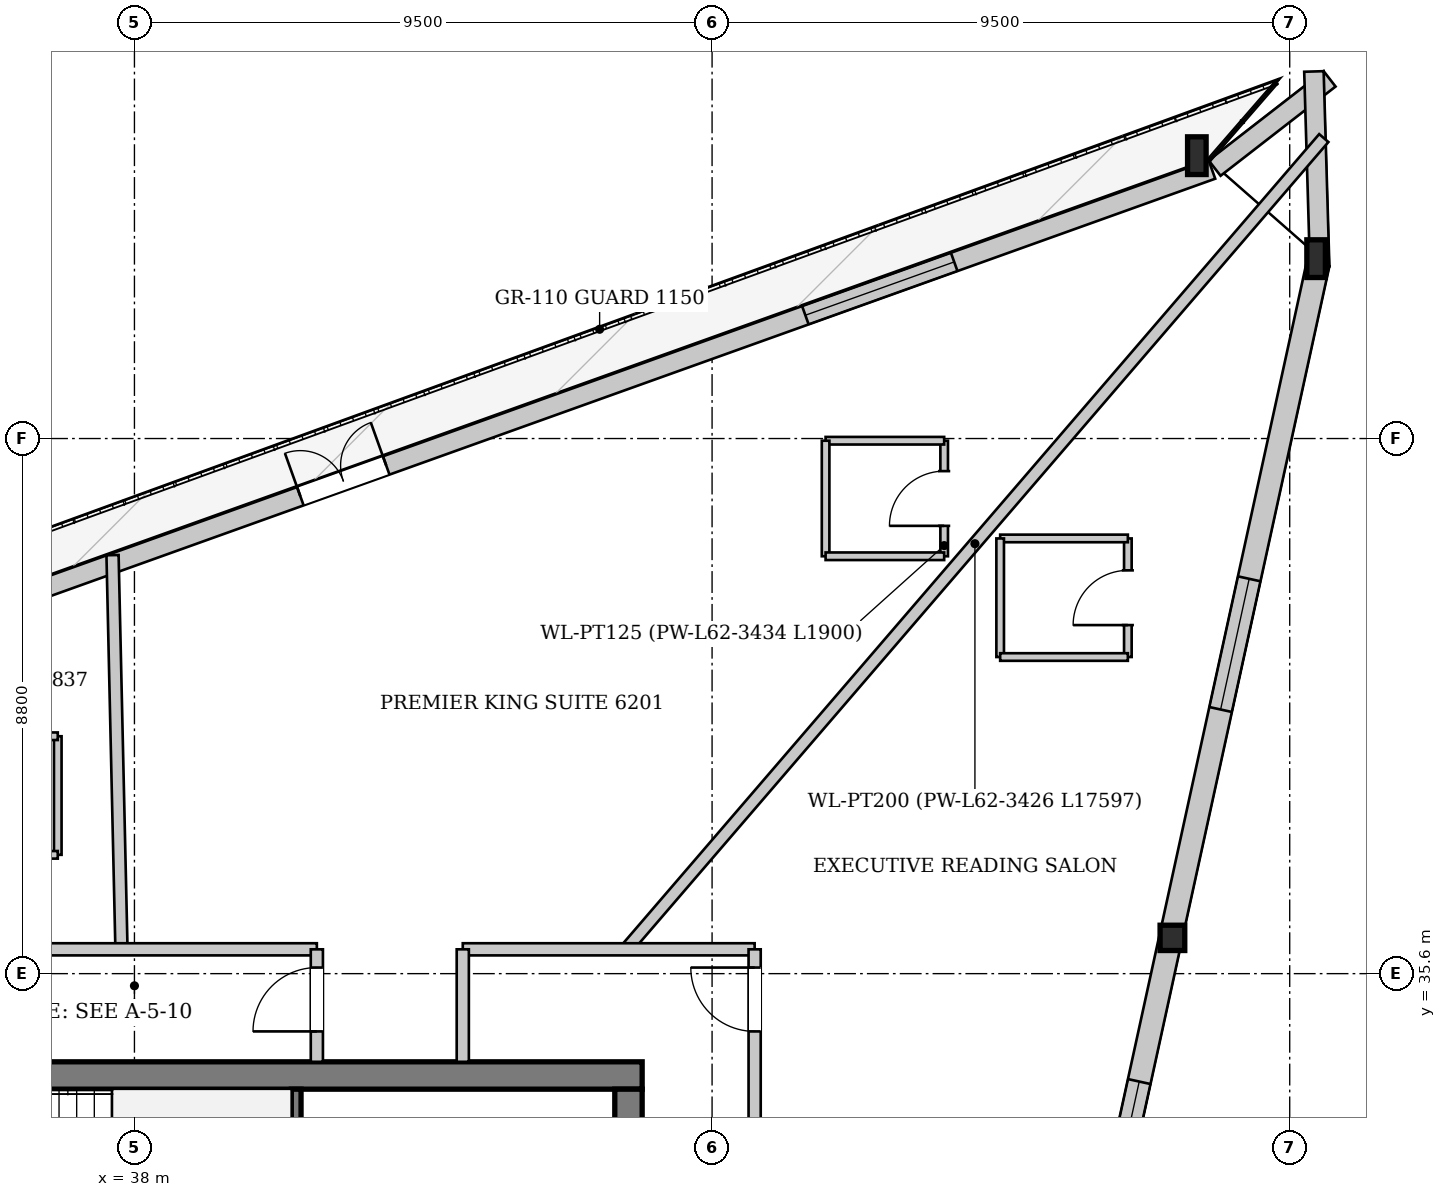
"""IFC4 building model, lengths in metres.
Left out: names, types, materials, properties, quantities, classifications, styles, units other than length and angle.
Written with IfcOpenShell. Run it as: python <this file> out.ifc"""

import sys

from ifc_helpers import new_model, si_unit, direction, frame, frame_2d, origin, origin_2d, place, context, subcontext, project, spatial, rectangle, i_section, extrude, source, transform, mapped, element, fill, save


model = new_model("IFC4")
c1 = context("Model", 3, precision=1e-05, world=origin(), true_north=direction((0.0, 1.0)))
c2 = subcontext(c1, "Body", "Model", "MODEL_VIEW")
j1 = project(units=[si_unit("LENGTHUNIT", "METRE"), si_unit("PLANEANGLEUNIT", "RADIAN")], contexts=[c1])
p1 = place(None, origin())
s1 = spatial("IfcSite", under=j1, at=p1, CompositionType="ELEMENT")
p2 = place(p1, origin())
s2 = spatial("IfcBuilding", under=s1, at=p2, CompositionType="ELEMENT")
p3 = place(p2, frame((0.0, 0.0, 234.5)))
s3 = spatial("IfcBuildingStorey", under=s2, at=p3, CompositionType="ELEMENT", Elevation=234.5)
m1 = source(origin(), c2, "Body", "SweptSolid", [
    extrude(i_section(OverallWidth=0.305, OverallDepth=0.62, WebThickness=0.021, FlangeThickness=0.04, at=origin_2d()), origin(), (0.0, 0.0, 1.0), 3.472),
])
p4 = place(p3, frame((57.653, 47.233, 0.0), z_axis=(-0.125805703613, 0.072150168757, 0.989427752838), x_axis=(-0.497496020718, -0.867466258347, 0.0)))
e1 = element("IfcColumn", 1, at=p4, inside=s3, PredefinedType="COLUMN", context=c2, shape_type="MappedRepresentation", body=[
    mapped(m1, transform((0.0, 0.0, 0.0), x_axis=(1.0, 0.0, 0.0), y_axis=(0.0, 1.0, 0.0), z_axis=(0.0, 0.0, 1.0), scale=1.0)),
])
m2 = source(origin(), c2, "Body", "SweptSolid", [
    extrude(i_section(OverallWidth=0.305, OverallDepth=0.62, WebThickness=0.021, FlangeThickness=0.04, at=origin_2d()), origin(), (0.0, 0.0, 1.0), 3.46),
])
p5 = place(p3, frame((55.667, 48.974, 0.0), z_axis=(-0.112317530713, 0.044941122528, 0.992655563527), x_axis=(-0.371491223958, -0.928436465528, 0.0)))
e2 = element("IfcColumn", 2, at=p5, inside=s3, PredefinedType="COLUMN", context=c2, shape_type="MappedRepresentation", body=[
    mapped(m2, transform((0.0, 0.0, 0.0), x_axis=(1.0, 0.0, 0.0), y_axis=(0.0, 1.0, 0.0), z_axis=(0.0, 0.0, 1.0), scale=1.0)),
])
m3 = source(origin(), c2, "Body", "SweptSolid", [
    extrude(i_section(OverallWidth=0.406, OverallDepth=0.416, WebThickness=0.027, FlangeThickness=0.042, at=origin_2d()), origin(), (0.0, 0.0, 1.0), 3.455),
])
p6 = place(p3, frame((55.209, 36.062, 0.0), z_axis=(-0.079842257415, 0.072847227783, 0.994142090113), x_axis=(-0.674005803271, -0.738726050141, 0.0)))
e3 = element("IfcColumn", 3, at=p6, inside=s3, PredefinedType="COLUMN", context=c2, shape_type="MappedRepresentation", body=[
    mapped(m3, transform((0.0, 0.0, 0.0), x_axis=(1.0, 0.0, 0.0), y_axis=(0.0, 1.0, 0.0), z_axis=(0.0, 0.0, 1.0), scale=1.0)),
])
p7 = place(p3, frame((34.711, 41.295, 0.0), z_axis=(0.0, 0.0, 1.0), x_axis=(0.941393680714, 0.337309854455, 0.0)))
e4 = element("IfcWall", 4, at=p7, inside=s3, PredefinedType="SOLIDWALL", context=c2, shape_type="SweptSolid", body=[
    extrude(rectangle(XDim=22.318, YDim=0.32, at=frame_2d((11.159, 0.0))), origin(), (0.0, 0.0, 1.0), 2.872),
])
p8 = place(p7, frame((6.392, 0.0, 0.0)))
e5 = element("IfcOpeningElement", 5, at=p8, cuts=e4, PredefinedType="OPENING", context=c2, shape_type="SweptSolid", body=[
    extrude(rectangle(XDim=1.5, YDim=2.3, at=frame_2d((0.75, 1.15))), frame((0.0, 0.17, 0.0), z_axis=(0.0, -1.0, 0.0), x_axis=(1.0, 0.0, 0.0)), (0.0, 0.0, 1.0), 0.34),
])
p9 = place(p7, frame((15.215, 0.0, 0.402)))
e6 = element("IfcOpeningElement", 6, at=p9, cuts=e4, PredefinedType="OPENING", context=c2, shape_type="SweptSolid", body=[
    extrude(rectangle(XDim=2.6, YDim=2.35, at=frame_2d((1.3, 1.175))), frame((0.0, 0.17, 0.0), z_axis=(0.0, -1.0, 0.0), x_axis=(1.0, 0.0, 0.0)), (0.0, 0.0, 1.0), 0.34),
])
p10 = place(p3, frame((55.765, 48.847, 0.0), z_axis=(0.0, 0.0, 1.0), x_axis=(0.790076637558, 0.613008080522, 0.0)))
e7 = element("IfcWall", 7, at=p10, inside=s3, PredefinedType="SOLIDWALL", context=c2, shape_type="SweptSolid", body=[
    extrude(rectangle(XDim=2.394, YDim=0.32, at=frame_2d((1.197, 0.0))), origin(), (0.0, 0.0, 1.0), 2.872),
])
p11 = place(p3, frame((57.398, 50.437, 0.0), z_axis=(0.0, 0.0, 1.0), x_axis=(0.029434813094, -0.999566702015, 0.0)))
e8 = element("IfcWall", 8, at=p11, inside=s3, PredefinedType="SOLIDWALL", context=c2, shape_type="SweptSolid", body=[
    extrude(rectangle(XDim=3.21, YDim=0.32, at=frame_2d((1.605, 0.0))), origin(), (0.0, 0.0, 1.0), 2.872),
])
p12 = place(p3, frame((57.467, 47.273, 0.0), z_axis=(0.0, 0.0, 1.0), x_axis=(-0.213695286904, -0.976900365623, 0.0)))
e9 = element("IfcWall", 9, at=p12, inside=s3, PredefinedType="SOLIDWALL", context=c2, shape_type="SweptSolid", body=[
    extrude(rectangle(XDim=22.869, YDim=0.38, at=frame_2d((11.435, 0.0))), origin(), (0.0, 0.0, 1.0), 2.872),
])
p13 = place(p12, frame((5.303, 0.0, 0.502)))
e10 = element("IfcOpeningElement", 10, at=p13, cuts=e9, PredefinedType="OPENING", context=c2, shape_type="SweptSolid", body=[
    extrude(rectangle(XDim=2.2, YDim=2.25, at=frame_2d((1.1, 1.125))), frame((0.0, 0.2, 0.0), z_axis=(0.0, -1.0, 0.0), x_axis=(1.0, 0.0, 0.0)), (0.0, 0.0, 1.0), 0.4),
])
p14 = place(p12, frame((13.766, 0.0, 0.502)))
e11 = element("IfcOpeningElement", 11, at=p14, cuts=e9, PredefinedType="OPENING", context=c2, shape_type="SweptSolid", body=[
    extrude(rectangle(XDim=2.2, YDim=2.25, at=frame_2d((1.1, 1.125))), frame((0.0, 0.2, 0.0), z_axis=(0.0, -1.0, 0.0), x_axis=(1.0, 0.0, 0.0)), (0.0, 0.0, 1.0), 0.4),
])
p15 = place(p3, frame((29.65, 33.925, 0.0), z_axis=(0.0, 0.0, 1.0), x_axis=(1.0, 0.0, 0.0)))
e12 = element("IfcWall", 12, at=p15, inside=s3, PredefinedType="SHEAR", context=c2, shape_type="SweptSolid", body=[
    extrude(rectangle(XDim=16.7, YDim=0.45, at=frame_2d((8.35, 0.0))), origin(), (0.0, 0.0, 1.0), 3.38),
])
p16 = place(p15, frame((1.45, 0.0, 0.0)))
e13 = element("IfcOpeningElement", 13, at=p16, cuts=e12, PredefinedType="OPENING", context=c2, shape_type="SweptSolid", body=[
    extrude(rectangle(XDim=0.95, YDim=2.1, at=frame_2d((0.475, 1.05))), frame((0.0, 0.235, 0.0), z_axis=(0.0, -1.0, 0.0), x_axis=(1.0, 0.0, 0.0)), (0.0, 0.0, 1.0), 0.47),
])
p17 = place(p15, frame((3.83, 0.0, 0.0)))
e14 = element("IfcOpeningElement", 14, at=p17, cuts=e12, PredefinedType="OPENING", context=c2, shape_type="SweptSolid", body=[
    extrude(rectangle(XDim=1.32, YDim=2.2, at=frame_2d((0.66, 1.1))), frame((0.0, 0.235, 0.0), z_axis=(0.0, -1.0, 0.0), x_axis=(1.0, 0.0, 0.0)), (0.0, 0.0, 1.0), 0.47),
])
p18 = place(p3, frame((46.125, 33.7, 0.0), z_axis=(0.0, 0.0, 1.0), x_axis=(0.0, -1.0, 0.0)))
e15 = element("IfcWall", 15, at=p18, inside=s3, PredefinedType="SHEAR", context=c2, shape_type="SweptSolid", body=[
    extrude(rectangle(XDim=14.2, YDim=0.45, at=frame_2d((7.1, 0.0))), origin(), (0.0, 0.0, 1.0), 3.38),
])
p19 = place(p18, frame((5.18, 0.0, 0.0)))
e16 = element("IfcOpeningElement", 16, at=p19, cuts=e15, PredefinedType="OPENING", context=c2, shape_type="SweptSolid", body=[
    extrude(rectangle(XDim=1.6, YDim=2.2, at=frame_2d((0.8, 1.1))), frame((0.0, 0.235, 0.0), z_axis=(0.0, -1.0, 0.0), x_axis=(1.0, 0.0, 0.0)), (0.0, 0.0, 1.0), 0.47),
])
p20 = place(p18, frame((2.05, 0.0, 0.0)))
e17 = element("IfcOpeningElement", 17, at=p20, cuts=e15, PredefinedType="OPENING", context=c2, shape_type="SweptSolid", body=[
    extrude(rectangle(XDim=0.95, YDim=2.1, at=frame_2d((0.475, 1.05))), frame((0.0, 0.235, 0.0), z_axis=(0.0, -1.0, 0.0), x_axis=(1.0, 0.0, 0.0)), (0.0, 0.0, 1.0), 0.47),
])
p21 = place(p3, frame((40.66, 30.6, 0.0), z_axis=(0.0, 0.0, 1.0), x_axis=(0.0, 1.0, 0.0)))
e18 = element("IfcWall", 18, at=p21, inside=s3, PredefinedType="PARTITIONING", context=c2, shape_type="SweptSolid", body=[
    extrude(rectangle(XDim=3.1, YDim=0.16, at=frame_2d((1.55, 0.0))), origin(), (0.0, 0.0, 1.0), 3.38),
])
p22 = place(p3, frame((46.085, 36.0, 0.0), z_axis=(0.0, 0.0, 1.0), x_axis=(0.652105460698, 0.758128266277, 0.0)))
e19 = element("IfcWall", 19, at=p22, inside=s3, PredefinedType="PARTITIONING", context=c2, shape_type="SweptSolid", body=[
    extrude(rectangle(XDim=17.597, YDim=0.2, at=frame_2d((8.799, 0.0))), origin(), (0.0, 0.0, 1.0), 2.975),
])
p23 = place(p3, frame((37.787, 36.0, 0.0), z_axis=(0.0, 0.0, 1.0), x_axis=(-0.022666666655, 0.999743078107, 0.0)))
e20 = element("IfcWall", 20, at=p23, inside=s3, PredefinedType="PARTITIONING", context=c2, shape_type="SweptSolid", body=[
    extrude(rectangle(XDim=6.484, YDim=0.2, at=frame_2d((3.242, 0.0))), origin(), (0.0, 0.0, 1.0), 3.38),
])
p24 = place(p3, frame((51.317, 42.464, 0.0), z_axis=(0.0, 0.0, 1.0), x_axis=(0.0, 1.0, 0.0)))
e21 = element("IfcWall", 21, at=p24, inside=s3, PredefinedType="PARTITIONING", context=c2, shape_type="SweptSolid", body=[
    extrude(rectangle(XDim=1.9, YDim=0.125, at=frame_2d((0.95, 0.0))), origin(), (0.0, 0.0, 1.0), 3.38),
])
p25 = place(p24, frame((0.5, 0.0, 0.0)))
e22 = element("IfcOpeningElement", 22, at=p25, cuts=e21, PredefinedType="OPENING", context=c2, shape_type="SweptSolid", body=[
    extrude(rectangle(XDim=0.9, YDim=2.1, at=frame_2d((0.45, 1.05))), frame((0.0, 0.073, 0.0), z_axis=(0.0, -1.0, 0.0), x_axis=(1.0, 0.0, 0.0)), (0.0, 0.0, 1.0), 0.145),
])
p26 = place(p3, frame((51.317, 44.364, 0.0), z_axis=(0.0, 0.0, 1.0), x_axis=(-1.0, 0.0, 0.0)))
e23 = element("IfcWall", 23, at=p26, inside=s3, PredefinedType="PARTITIONING", context=c2, shape_type="SweptSolid", body=[
    extrude(rectangle(XDim=1.95, YDim=0.125, at=frame_2d((0.975, 0.0))), origin(), (0.0, 0.0, 1.0), 3.38),
])
p27 = place(p3, frame((49.367, 44.364, 0.0), z_axis=(0.0, 0.0, 1.0), x_axis=(0.0, -1.0, 0.0)))
e24 = element("IfcWall", 24, at=p27, inside=s3, PredefinedType="PARTITIONING", context=c2, shape_type="SweptSolid", body=[
    extrude(rectangle(XDim=1.9, YDim=0.125, at=frame_2d((0.95, 0.0))), origin(), (0.0, 0.0, 1.0), 3.38),
])
p28 = place(p3, frame((49.367, 42.464, 0.0), z_axis=(0.0, 0.0, 1.0), x_axis=(1.0, 0.0, 0.0)))
e25 = element("IfcWall", 25, at=p28, inside=s3, PredefinedType="PARTITIONING", context=c2, shape_type="SweptSolid", body=[
    extrude(rectangle(XDim=1.95, YDim=0.125, at=frame_2d((0.975, 0.0))), origin(), (0.0, 0.0, 1.0), 3.125),
])
p29 = place(p3, frame((36.739, 37.554, 0.0), z_axis=(0.0, 0.0, 1.0), x_axis=(0.0, 1.0, 0.0)))
e26 = element("IfcWall", 26, at=p29, inside=s3, PredefinedType="PARTITIONING", context=c2, shape_type="SweptSolid", body=[
    extrude(rectangle(XDim=1.95, YDim=0.125, at=frame_2d((0.975, 0.0))), origin(), (0.0, 0.0, 1.0), 3.38),
])
p30 = place(p3, frame((36.739, 39.504, 0.0), z_axis=(0.0, 0.0, 1.0), x_axis=(-1.0, 0.0, 0.0)))
e27 = element("IfcWall", 27, at=p30, inside=s3, PredefinedType="PARTITIONING", context=c2, shape_type="SweptSolid", body=[
    extrude(rectangle(XDim=2.4, YDim=0.125, at=frame_2d((1.2, 0.0))), origin(), (0.0, 0.0, 1.0), 3.38),
])
p31 = place(p30, frame((0.75, 0.0, 0.0)))
e28 = element("IfcOpeningElement", 28, at=p31, cuts=e27, PredefinedType="OPENING", context=c2, shape_type="SweptSolid", body=[
    extrude(rectangle(XDim=0.9, YDim=2.1, at=frame_2d((0.45, 1.05))), frame((0.0, 0.073, 0.0), z_axis=(0.0, -1.0, 0.0), x_axis=(1.0, 0.0, 0.0)), (0.0, 0.0, 1.0), 0.145),
])
p32 = place(p3, frame((34.339, 37.554, 0.0), z_axis=(0.0, 0.0, 1.0), x_axis=(1.0, 0.0, 0.0)))
e29 = element("IfcWall", 29, at=p32, inside=s3, PredefinedType="PARTITIONING", context=c2, shape_type="SweptSolid", body=[
    extrude(rectangle(XDim=2.4, YDim=0.125, at=frame_2d((1.2, 0.0))), origin(), (0.0, 0.0, 1.0), 3.38),
])
p33 = place(p3, frame((54.338, 40.807, 0.0), z_axis=(0.0, 0.0, 1.0), x_axis=(0.0, 1.0, 0.0)))
e30 = element("IfcWall", 30, at=p33, inside=s3, PredefinedType="PARTITIONING", context=c2, shape_type="SweptSolid", body=[
    extrude(rectangle(XDim=1.95, YDim=0.125, at=frame_2d((0.975, 0.0))), origin(), (0.0, 0.0, 1.0), 3.38),
])
p34 = place(p33, frame((0.525, 0.0, 0.0)))
e31 = element("IfcOpeningElement", 31, at=p34, cuts=e30, PredefinedType="OPENING", context=c2, shape_type="SweptSolid", body=[
    extrude(rectangle(XDim=0.9, YDim=2.1, at=frame_2d((0.45, 1.05))), frame((0.0, 0.073, 0.0), z_axis=(0.0, -1.0, 0.0), x_axis=(1.0, 0.0, 0.0)), (0.0, 0.0, 1.0), 0.145),
])
p35 = place(p3, frame((54.338, 42.757, 0.0), z_axis=(0.0, 0.0, 1.0), x_axis=(-1.0, 0.0, 0.0)))
e32 = element("IfcWall", 32, at=p35, inside=s3, PredefinedType="PARTITIONING", context=c2, shape_type="SweptSolid", body=[
    extrude(rectangle(XDim=2.1, YDim=0.125, at=frame_2d((1.05, 0.0))), origin(), (0.0, 0.0, 1.0), 3.38),
])
p36 = place(p3, frame((52.238, 42.757, 0.0), z_axis=(0.0, 0.0, 1.0), x_axis=(0.0, -1.0, 0.0)))
e33 = element("IfcWall", 33, at=p36, inside=s3, PredefinedType="PARTITIONING", context=c2, shape_type="SweptSolid", body=[
    extrude(rectangle(XDim=1.95, YDim=0.125, at=frame_2d((0.975, 0.0))), origin(), (0.0, 0.0, 1.0), 3.38),
])
p37 = place(p3, frame((52.238, 40.807, 0.0), z_axis=(0.0, 0.0, 1.0), x_axis=(1.0, 0.0, 0.0)))
e34 = element("IfcWall", 34, at=p37, inside=s3, PredefinedType="PARTITIONING", context=c2, shape_type="SweptSolid", body=[
    extrude(rectangle(XDim=2.1, YDim=0.125, at=frame_2d((1.05, 0.0))), origin(), (0.0, 0.0, 1.0), 3.38),
])
p38 = place(p3, frame((27.8, 36.0, 0.0), z_axis=(0.0, 0.0, 1.0), x_axis=(1.0, 0.0, 0.0)))
e35 = element("IfcWall", 35, at=p38, inside=s3, PredefinedType="PARTITIONING", context=c2, shape_type="SweptSolid", body=[
    extrude(rectangle(XDim=13.2, YDim=0.2, at=frame_2d((6.6, 0.0))), origin(), (0.0, 0.0, 1.0), 3.38),
])
p39 = place(p38, frame((3.983, 0.0, 0.0)))
e36 = element("IfcOpeningElement", 36, at=p39, cuts=e35, PredefinedType="OPENING", context=c2, shape_type="SweptSolid", body=[
    extrude(rectangle(XDim=1.05, YDim=2.2, at=frame_2d((0.525, 1.1))), frame((0.0, 0.11, 0.0), z_axis=(0.0, -1.0, 0.0), x_axis=(1.0, 0.0, 0.0)), (0.0, 0.0, 1.0), 0.22),
])
p40 = place(p3, frame((41.0, 34.15, 0.0), z_axis=(0.0, 0.0, 1.0), x_axis=(0.0, 1.0, 0.0)))
e37 = element("IfcWall", 37, at=p40, inside=s3, PredefinedType="PARTITIONING", context=c2, shape_type="SweptSolid", body=[
    extrude(rectangle(XDim=1.85, YDim=0.2, at=frame_2d((0.925, 0.0))), origin(), (0.0, 0.0, 1.0), 3.38),
])
p41 = place(p40, frame((0.5, 0.0, 0.0)))
e38 = element("IfcOpeningElement", 38, at=p41, cuts=e37, PredefinedType="OPENING", context=c2, shape_type="SweptSolid", body=[
    extrude(rectangle(XDim=1.05, YDim=2.2, at=frame_2d((0.525, 1.1))), frame((0.0, 0.11, 0.0), z_axis=(0.0, -1.0, 0.0), x_axis=(1.0, 0.0, 0.0)), (0.0, 0.0, 1.0), 0.22),
])
p42 = place(p3, frame((43.4, 36.0, 0.0), z_axis=(0.0, 0.0, 1.0), x_axis=(1.0, 0.0, 0.0)))
e39 = element("IfcWall", 39, at=p42, inside=s3, PredefinedType="PARTITIONING", context=c2, shape_type="SweptSolid", body=[
    extrude(rectangle(XDim=4.8, YDim=0.2, at=frame_2d((2.4, 0.0))), origin(), (0.0, 0.0, 1.0), 3.38),
])
p43 = place(p3, frame((43.4, 34.15, 0.0), z_axis=(0.0, 0.0, 1.0), x_axis=(0.0, 1.0, 0.0)))
e40 = element("IfcWall", 40, at=p43, inside=s3, PredefinedType="PARTITIONING", context=c2, shape_type="SweptSolid", body=[
    extrude(rectangle(XDim=1.85, YDim=0.2, at=frame_2d((0.925, 0.0))), origin(), (0.0, 0.0, 1.0), 3.38),
])
p44 = place(p3, frame((48.2, 17.2, 0.0), z_axis=(0.0, 0.0, 1.0), x_axis=(0.0, 1.0, 0.0)))
e41 = element("IfcWall", 41, at=p44, inside=s3, PredefinedType="PARTITIONING", context=c2, shape_type="SweptSolid", body=[
    extrude(rectangle(XDim=18.8, YDim=0.2, at=frame_2d((9.4, 0.0))), origin(), (0.0, 0.0, 1.0), 3.065),
])
p45 = place(p44, frame((4.507, 0.0, 0.0)))
e42 = element("IfcOpeningElement", 42, at=p45, cuts=e41, PredefinedType="OPENING", context=c2, shape_type="SweptSolid", body=[
    extrude(rectangle(XDim=1.05, YDim=2.2, at=frame_2d((0.525, 1.1))), frame((0.0, 0.11, 0.0), z_axis=(0.0, -1.0, 0.0), x_axis=(1.0, 0.0, 0.0)), (0.0, 0.0, 1.0), 0.22),
])
p46 = place(p44, frame((17.45, 0.0, 0.0)))
e43 = element("IfcOpeningElement", 43, at=p46, cuts=e41, PredefinedType="OPENING", context=c2, shape_type="SweptSolid", body=[
    extrude(rectangle(XDim=1.05, YDim=2.2, at=frame_2d((0.525, 1.1))), frame((0.0, 0.11, 0.0), z_axis=(0.0, -1.0, 0.0), x_axis=(1.0, 0.0, 0.0)), (0.0, 0.0, 1.0), 0.22),
])
m4 = source(origin(), c2, "Body", "SweptSolid", [
    extrude(rectangle(XDim=1.5, YDim=2.3, at=frame_2d((0.75, 1.15))), frame((0.0, 0.025, 0.0), z_axis=(0.0, -1.0, 0.0), x_axis=(1.0, 0.0, 0.0)), (0.0, 0.0, 1.0), 0.05),
])
p47 = place(p8, origin())
e44 = element("IfcDoor", 44, at=p47, inside=s3, OperationType="DOUBLE_DOOR_SINGLE_SWING", PredefinedType="DOOR", context=c2, shape_type="MappedRepresentation", body=[
    mapped(m4, transform((0.0, 0.0, 0.0), x_axis=(1.0, 0.0, 0.0), y_axis=(0.0, 1.0, 0.0), z_axis=(0.0, 0.0, 1.0), scale=1.0)),
])
fill(e5, e44)
m5 = source(origin(), c2, "Body", "SweptSolid", [
    extrude(rectangle(XDim=2.6, YDim=2.35, at=frame_2d((1.3, 1.175))), frame((0.0, 0.03, 0.0), z_axis=(0.0, -1.0, 0.0), x_axis=(1.0, 0.0, 0.0)), (0.0, 0.0, 1.0), 0.06),
])
p48 = place(p9, origin())
e45 = element("IfcWindow", 45, at=p48, inside=s3, PartitioningType="SINGLE_PANEL", PredefinedType="WINDOW", context=c2, shape_type="MappedRepresentation", body=[
    mapped(m5, transform((0.0, 0.0, 0.0), x_axis=(1.0, 0.0, 0.0), y_axis=(0.0, 1.0, 0.0), z_axis=(0.0, 0.0, 1.0), scale=1.0)),
])
fill(e6, e45)
m6 = source(origin(), c2, "Body", "SweptSolid", [
    extrude(rectangle(XDim=2.2, YDim=2.25, at=frame_2d((1.1, 1.125))), frame((0.0, 0.03, 0.0), z_axis=(0.0, -1.0, 0.0), x_axis=(1.0, 0.0, 0.0)), (0.0, 0.0, 1.0), 0.06),
])
p49 = place(p13, origin())
e46 = element("IfcWindow", 46, at=p49, inside=s3, PartitioningType="SINGLE_PANEL", PredefinedType="WINDOW", context=c2, shape_type="MappedRepresentation", body=[
    mapped(m6, transform((0.0, 0.0, 0.0), x_axis=(1.0, 0.0, 0.0), y_axis=(0.0, 1.0, 0.0), z_axis=(0.0, 0.0, 1.0), scale=1.0)),
])
fill(e10, e46)
p50 = place(p14, origin())
e47 = element("IfcWindow", 47, at=p50, inside=s3, PartitioningType="SINGLE_PANEL", PredefinedType="WINDOW", context=c2, shape_type="MappedRepresentation", body=[
    mapped(m6, transform((0.0, 0.0, 0.0), x_axis=(1.0, 0.0, 0.0), y_axis=(0.0, 1.0, 0.0), z_axis=(0.0, 0.0, 1.0), scale=1.0)),
])
fill(e11, e47)
m7 = source(origin(), c2, "Body", "SweptSolid", [
    extrude(rectangle(XDim=0.9, YDim=2.1, at=frame_2d((0.45, 1.05))), frame((0.0, 0.025, 0.0), z_axis=(0.0, -1.0, 0.0), x_axis=(1.0, 0.0, 0.0)), (0.0, 0.0, 1.0), 0.05),
])
p51 = place(p25, origin())
e48 = element("IfcDoor", 48, at=p51, inside=s3, OperationType="SINGLE_SWING_LEFT", PredefinedType="DOOR", context=c2, shape_type="MappedRepresentation", body=[
    mapped(m7, transform((0.0, 0.0, 0.0), x_axis=(1.0, 0.0, 0.0), y_axis=(0.0, 1.0, 0.0), z_axis=(0.0, 0.0, 1.0), scale=1.0)),
])
fill(e22, e48)
p52 = place(p34, origin())
e49 = element("IfcDoor", 49, at=p52, inside=s3, OperationType="SINGLE_SWING_LEFT", PredefinedType="DOOR", context=c2, shape_type="MappedRepresentation", body=[
    mapped(m7, transform((0.0, 0.0, 0.0), x_axis=(1.0, 0.0, 0.0), y_axis=(0.0, 1.0, 0.0), z_axis=(0.0, 0.0, 1.0), scale=1.0)),
])
fill(e31, e49)
m8 = source(origin(), c2, "Body", "SweptSolid", [
    extrude(rectangle(XDim=1.05, YDim=2.2, at=frame_2d((0.525, 1.1))), frame((0.0, 0.025, 0.0), z_axis=(0.0, -1.0, 0.0), x_axis=(1.0, 0.0, 0.0)), (0.0, 0.0, 1.0), 0.05),
])
p53 = place(p41, origin())
e50 = element("IfcDoor", 50, at=p53, inside=s3, OperationType="SINGLE_SWING_LEFT", PredefinedType="DOOR", context=c2, shape_type="MappedRepresentation", body=[
    mapped(m8, transform((0.0, 0.0, 0.0), x_axis=(1.0, 0.0, 0.0), y_axis=(0.0, 1.0, 0.0), z_axis=(0.0, 0.0, 1.0), scale=1.0)),
])
fill(e38, e50)
p54 = place(p46, origin())
e51 = element("IfcDoor", 51, at=p54, inside=s3, OperationType="SINGLE_SWING_RIGHT", PredefinedType="DOOR", context=c2, shape_type="MappedRepresentation", body=[
    mapped(m8, transform((0.0, 0.0, 0.0), x_axis=(1.0, 0.0, 0.0), y_axis=(0.0, 1.0, 0.0), z_axis=(0.0, 0.0, 1.0), scale=1.0)),
])
fill(e43, e51)
save(model, sys.argv[1])
